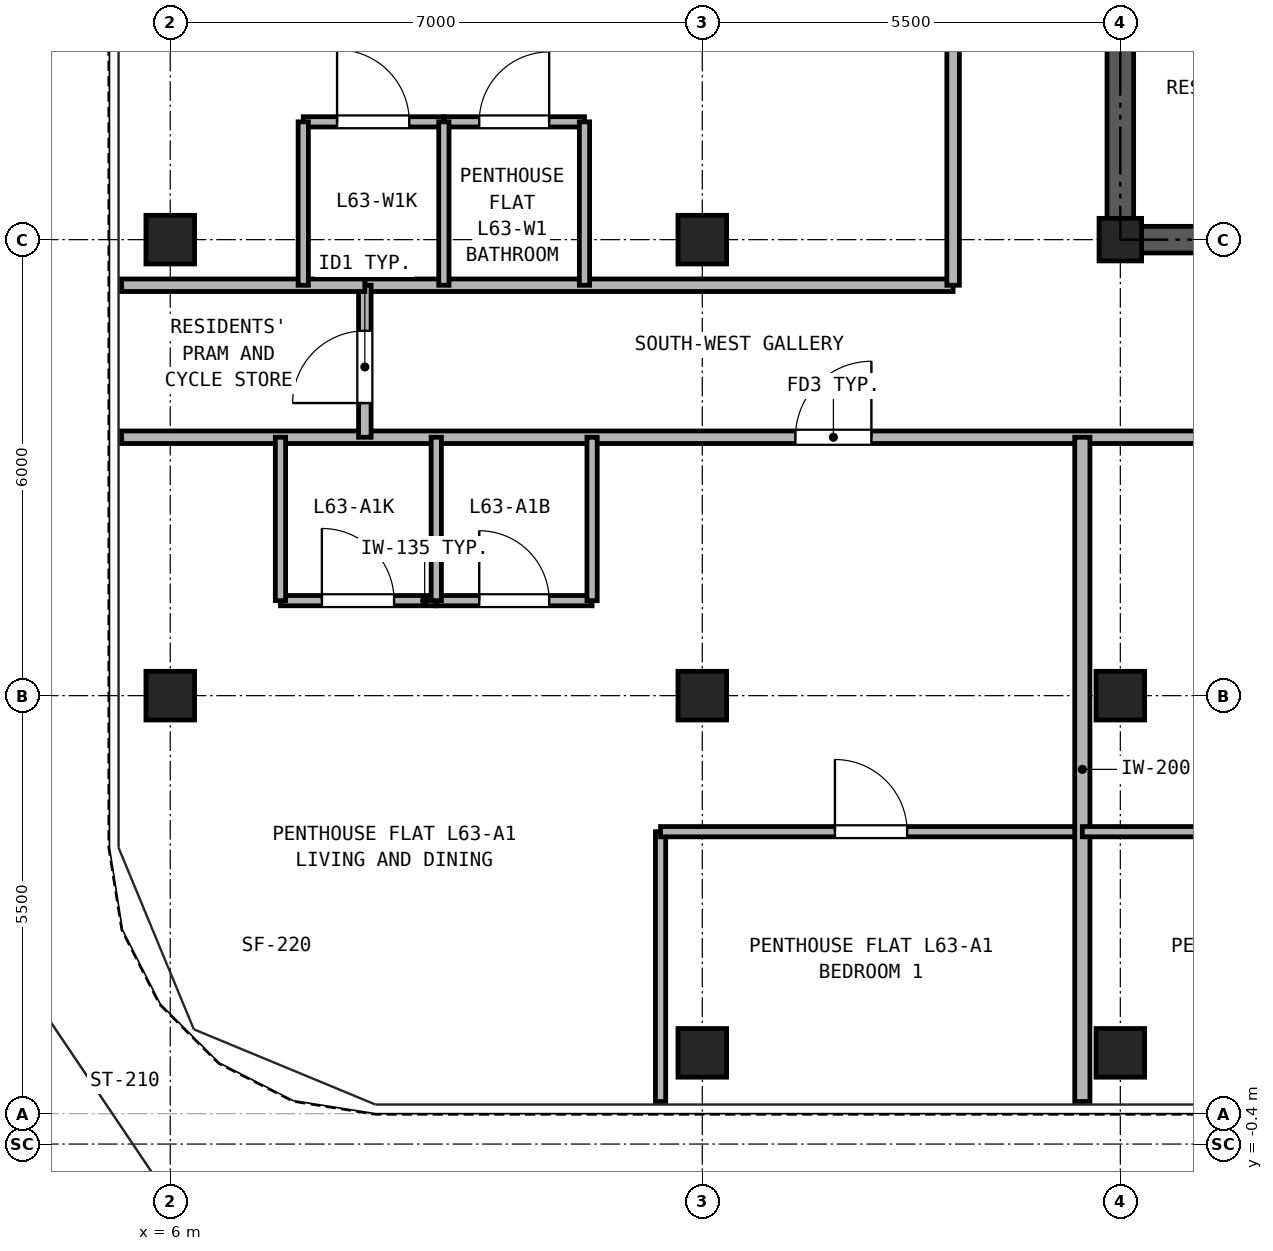
"""IFC4 building model, lengths in metres.
Left out: names, types, materials, properties, quantities, classifications, styles, units other than length and angle.
Written with IfcOpenShell. Run it as: python <this file> out.ifc"""

import sys

from ifc_helpers import new_model, si_unit, direction, frame, frame_2d, origin, origin_2d, place, context, subcontext, project, spatial, rectangle, hollow_rectangle, extrude, source, transform, mapped, element, fill, save


model = new_model("IFC4")
c1 = context("Model", 3, precision=1e-05, world=origin(), true_north=direction((0.0, 1.0)))
c2 = subcontext(c1, "Body", "Model", "MODEL_VIEW")
j1 = project(units=[si_unit("LENGTHUNIT", "METRE"), si_unit("PLANEANGLEUNIT", "RADIAN")], contexts=[c1])
p1 = place(None, origin())
s1 = spatial("IfcSite", under=j1, at=p1, CompositionType="ELEMENT")
p2 = place(p1, origin())
s2 = spatial("IfcBuilding", under=s1, at=p2, CompositionType="ELEMENT")
p3 = place(p2, frame((0.0, 0.0, 223.3)))
s3 = spatial("IfcBuildingStorey", under=s2, at=p3, CompositionType="ELEMENT", Elevation=223.3)
m1 = source(origin(), c2, "Body", "SweptSolid", [
    extrude(hollow_rectangle(XDim=0.64, YDim=0.64, WallThickness=0.035, at=origin_2d()), origin(), (0.0, 0.0, 1.0), 2.98),
])
for number, where, z_axis, x_axis in (
    (1, (13.0, 0.8, 0.0), (0.0, 0.0, 1.0), (1.0, 0.0, 0.0)),
    (2, (18.5, 0.8, 0.0), (0.0, 0.0, 1.0), (1.0, 0.0, 0.0)),
    (3, (6.0, 5.5, 0.0), (0.0, 0.0, 1.0), (1.0, 0.0, 0.0)),
    (4, (6.0, 11.5, 0.0), (0.0, 0.0, 1.0), (1.0, 0.0, 0.0)),
    (5, (13.0, 5.5, 0.0), (0.0, 0.0, 1.0), (1.0, 0.0, 0.0)),
    (6, (13.0, 11.5, 0.0), (0.0, 0.0, 1.0), (1.0, 0.0, 0.0)),
    (7, (18.5, 5.5, 0.0), (0.0, 0.0, 1.0), (1.0, 0.0, 0.0)),
):
    element("IfcColumn", number, at=place(p3, frame(where, z_axis=z_axis, x_axis=x_axis)), inside=s3, PredefinedType="COLUMN", context=c2, shape_type="MappedRepresentation", body=[
        mapped(m1, transform((0.0, 0.0, 0.0), x_axis=(1.0, 0.0, 0.0), y_axis=(0.0, 1.0, 0.0), z_axis=(0.0, 0.0, 1.0), scale=1.0)),
    ])
m2 = source(origin(), c2, "Body", "SweptSolid", [
    extrude(hollow_rectangle(XDim=0.56, YDim=0.56, WallThickness=0.03, at=origin_2d()), origin(), (0.0, 0.0, 1.0), 2.98),
])
p4 = place(p3, frame((18.5, 11.5, 0.0), z_axis=(0.0, 0.0, 1.0), x_axis=(1.0, 0.0, 0.0)))
e8 = element("IfcColumn", 8, at=p4, inside=s3, PredefinedType="COLUMN", context=c2, shape_type="MappedRepresentation", body=[
    mapped(m2, transform((0.0, 0.0, 0.0), x_axis=(1.0, 0.0, 0.0), y_axis=(0.0, 1.0, 0.0), z_axis=(0.0, 0.0, 1.0), scale=1.0)),
])
p5 = place(p3, frame((18.325, 11.5, 0.0), z_axis=(0.0, 0.0, 1.0), x_axis=(1.0, 0.0, 0.0)))
e9 = element("IfcWall", 9, at=p5, inside=s3, PredefinedType="SHEAR", context=c2, shape_type="SweptSolid", body=[
    extrude(rectangle(XDim=10.35, YDim=0.35, at=frame_2d((5.175, 0.0))), origin(), (0.0, 0.0, 1.0), 2.98),
])
p6 = place(p5, frame((1.775, 0.0, 0.0)))
e10 = element("IfcOpeningElement", 10, at=p6, cuts=e9, PredefinedType="OPENING", context=c2, shape_type="SweptSolid", body=[
    extrude(rectangle(XDim=0.95, YDim=2.15, at=frame_2d((0.475, 1.075))), frame((0.0, 0.185, 0.0), z_axis=(0.0, -1.0, 0.0), x_axis=(1.0, 0.0, 0.0)), (0.0, 0.0, 1.0), 0.37),
])
p7 = place(p5, frame((5.275, 0.0, 0.0)))
e11 = element("IfcOpeningElement", 11, at=p7, cuts=e9, PredefinedType="OPENING", context=c2, shape_type="SweptSolid", body=[
    extrude(rectangle(XDim=0.95, YDim=2.15, at=frame_2d((0.475, 1.075))), frame((0.0, 0.185, 0.0), z_axis=(0.0, -1.0, 0.0), x_axis=(1.0, 0.0, 0.0)), (0.0, 0.0, 1.0), 0.37),
])
p8 = place(p5, frame((8.175, 0.0, 0.0)))
e12 = element("IfcOpeningElement", 12, at=p8, cuts=e9, PredefinedType="OPENING", context=c2, shape_type="SweptSolid", body=[
    extrude(rectangle(XDim=1.1, YDim=2.25, at=frame_2d((0.55, 1.125))), frame((0.0, 0.185, 0.0), z_axis=(0.0, -1.0, 0.0), x_axis=(1.0, 0.0, 0.0)), (0.0, 0.0, 1.0), 0.37),
])
p9 = place(p3, frame((18.5, 11.675, 0.0), z_axis=(0.0, 0.0, 1.0), x_axis=(0.0, 1.0, 0.0)))
e13 = element("IfcWall", 13, at=p9, inside=s3, PredefinedType="SHEAR", context=c2, shape_type="SweptSolid", body=[
    extrude(rectangle(XDim=16.9, YDim=0.35, at=frame_2d((8.45, 0.0))), origin(), (0.0, 0.0, 1.0), 2.98),
])
p10 = place(p9, frame((7.475, 0.0, 0.0)))
e14 = element("IfcOpeningElement", 14, at=p10, cuts=e13, PredefinedType="OPENING", context=c2, shape_type="SweptSolid", body=[
    extrude(rectangle(XDim=1.15, YDim=2.2, at=frame_2d((0.575, 1.1))), frame((0.0, 0.185, 0.0), z_axis=(0.0, -1.0, 0.0), x_axis=(1.0, 0.0, 0.0)), (0.0, 0.0, 1.0), 0.37),
])
p11 = place(p3, frame((5.36, 8.9, 0.0), z_axis=(0.0, 0.0, 1.0), x_axis=(1.0, 0.0, 0.0)))
e15 = element("IfcWall", 15, at=p11, inside=s3, PredefinedType="PARTITIONING", context=c2, shape_type="SweptSolid", body=[
    extrude(rectangle(XDim=36.28, YDim=0.165, at=frame_2d((18.14, 0.0))), origin(), (0.0, 0.0, 1.0), 2.98),
])
p12 = place(p11, frame((8.865, 0.0, 0.0)))
e16 = element("IfcOpeningElement", 16, at=p12, cuts=e15, PredefinedType="OPENING", context=c2, shape_type="SweptSolid", body=[
    extrude(rectangle(XDim=1.0, YDim=2.15, at=frame_2d((0.5, 1.075))), frame((0.0, 0.093, 0.0), z_axis=(0.0, -1.0, 0.0), x_axis=(1.0, 0.0, 0.0)), (0.0, 0.0, 1.0), 0.185),
])
p13 = place(p11, frame((14.665, 0.0, 0.0)))
e17 = element("IfcOpeningElement", 17, at=p13, cuts=e15, PredefinedType="OPENING", context=c2, shape_type="SweptSolid", body=[
    extrude(rectangle(XDim=1.0, YDim=2.15, at=frame_2d((0.5, 1.075))), frame((0.0, 0.093, 0.0), z_axis=(0.0, -1.0, 0.0), x_axis=(1.0, 0.0, 0.0)), (0.0, 0.0, 1.0), 0.185),
])
p14 = place(p11, frame((26.915, 0.0, 0.0)))
e18 = element("IfcOpeningElement", 18, at=p14, cuts=e15, PredefinedType="OPENING", context=c2, shape_type="SweptSolid", body=[
    extrude(rectangle(XDim=1.0, YDim=2.15, at=frame_2d((0.5, 1.075))), frame((0.0, 0.093, 0.0), z_axis=(0.0, -1.0, 0.0), x_axis=(1.0, 0.0, 0.0)), (0.0, 0.0, 1.0), 0.185),
])
p15 = place(p3, frame((8.56, 10.9, 0.0), z_axis=(0.0, 0.0, 1.0), x_axis=(1.0, 0.0, 0.0)))
e19 = element("IfcWall", 19, at=p15, inside=s3, PredefinedType="PARTITIONING", context=c2, shape_type="SweptSolid", body=[
    extrude(rectangle(XDim=7.74, YDim=0.165, at=frame_2d((3.87, 0.0))), origin(), (0.0, 0.0, 1.0), 2.98),
])
p16 = place(p3, frame((8.56, 8.9, 0.0), z_axis=(0.0, 0.0, 1.0), x_axis=(0.0, 1.0, 0.0)))
e20 = element("IfcWall", 20, at=p16, inside=s3, PredefinedType="PARTITIONING", context=c2, shape_type="SweptSolid", body=[
    extrude(rectangle(XDim=2.0, YDim=0.165, at=frame_2d((1.0, 0.0))), origin(), (0.0, 0.0, 1.0), 2.98),
])
p17 = place(p16, frame((0.45, 0.0, 0.0)))
e21 = element("IfcOpeningElement", 21, at=p17, cuts=e20, PredefinedType="OPENING", context=c2, shape_type="SweptSolid", body=[
    extrude(rectangle(XDim=0.95, YDim=2.15, at=frame_2d((0.475, 1.075))), frame((0.0, 0.093, 0.0), z_axis=(0.0, -1.0, 0.0), x_axis=(1.0, 0.0, 0.0)), (0.0, 0.0, 1.0), 0.185),
])
p18 = place(p3, frame((16.3, 10.9, 0.0), z_axis=(0.0, 0.0, 1.0), x_axis=(0.0, 1.0, 0.0)))
e22 = element("IfcWall", 22, at=p18, inside=s3, PredefinedType="PARTITIONING", context=c2, shape_type="SweptSolid", body=[
    extrude(rectangle(XDim=24.24, YDim=0.165, at=frame_2d((12.12, 0.0))), origin(), (0.0, 0.0, 1.0), 2.98),
])
p19 = place(p18, frame((5.05, 0.0, 0.0)))
e23 = element("IfcOpeningElement", 23, at=p19, cuts=e22, PredefinedType="OPENING", context=c2, shape_type="SweptSolid", body=[
    extrude(rectangle(XDim=1.0, YDim=2.15, at=frame_2d((0.5, 1.075))), frame((0.0, 0.093, 0.0), z_axis=(0.0, -1.0, 0.0), x_axis=(1.0, 0.0, 0.0)), (0.0, 0.0, 1.0), 0.185),
])
p20 = place(p18, frame((14.8, 0.0, 0.0)))
e24 = element("IfcOpeningElement", 24, at=p20, cuts=e22, PredefinedType="OPENING", context=c2, shape_type="SweptSolid", body=[
    extrude(rectangle(XDim=1.0, YDim=2.15, at=frame_2d((0.5, 1.075))), frame((0.0, 0.093, 0.0), z_axis=(0.0, -1.0, 0.0), x_axis=(1.0, 0.0, 0.0)), (0.0, 0.0, 1.0), 0.185),
])
p21 = place(p3, frame((7.45, 6.75, 0.0), z_axis=(0.0, 0.0, 1.0), x_axis=(1.0, 0.0, 0.0)))
e25 = element("IfcWall", 25, at=p21, inside=s3, PredefinedType="PARTITIONING", context=c2, shape_type="SweptSolid", body=[
    extrude(rectangle(XDim=2.05, YDim=0.135, at=frame_2d((1.025, 0.0))), origin(), (0.0, 0.0, 1.0), 2.98),
])
p22 = place(p21, frame((0.545, 0.0, 0.0)))
e26 = element("IfcOpeningElement", 26, at=p22, cuts=e25, PredefinedType="OPENING", context=c2, shape_type="SweptSolid", body=[
    extrude(rectangle(XDim=0.95, YDim=2.15, at=frame_2d((0.475, 1.075))), frame((0.0, 0.077, 0.0), z_axis=(0.0, -1.0, 0.0), x_axis=(1.0, 0.0, 0.0)), (0.0, 0.0, 1.0), 0.155),
])
p23 = place(p3, frame((9.5, 6.75, 0.0), z_axis=(0.0, 0.0, 1.0), x_axis=(1.0, 0.0, 0.0)))
e27 = element("IfcWall", 27, at=p23, inside=s3, PredefinedType="PARTITIONING", context=c2, shape_type="SweptSolid", body=[
    extrude(rectangle(XDim=2.05, YDim=0.135, at=frame_2d((1.025, 0.0))), origin(), (0.0, 0.0, 1.0), 2.98),
])
p24 = place(p23, frame((0.565, 0.0, 0.0)))
e28 = element("IfcOpeningElement", 28, at=p24, cuts=e27, PredefinedType="OPENING", context=c2, shape_type="SweptSolid", body=[
    extrude(rectangle(XDim=0.92, YDim=2.1, at=frame_2d((0.46, 1.05))), frame((0.0, 0.077, 0.0), z_axis=(0.0, -1.0, 0.0), x_axis=(1.0, 0.0, 0.0)), (0.0, 0.0, 1.0), 0.155),
])
for number, where, z_axis, x_axis in (
    (29, (7.45, 6.75, 0.0), (0.0, 0.0, 1.0), (0.0, 1.0, 0.0)),
    (30, (9.5, 6.75, 0.0), (0.0, 0.0, 1.0), (0.0, 1.0, 0.0)),
    (31, (11.55, 6.75, 0.0), (0.0, 0.0, 1.0), (0.0, 1.0, 0.0)),
):
    element("IfcWall", number, at=place(p3, frame(where, z_axis=z_axis, x_axis=x_axis)), inside=s3, PredefinedType="PARTITIONING", context=c2, shape_type="SweptSolid", body=[
        extrude(rectangle(XDim=2.15, YDim=0.135, at=frame_2d((1.075, 0.0))), origin(), (0.0, 0.0, 1.0), 2.98),
    ])
p25 = place(p3, frame((12.451, 0.16, 0.0), z_axis=(0.0, 0.0, 1.0), x_axis=(0.0, 1.0, 0.0)))
e32 = element("IfcWall", 32, at=p25, inside=s3, PredefinedType="PARTITIONING", context=c2, shape_type="SweptSolid", body=[
    extrude(rectangle(XDim=3.55, YDim=0.135, at=frame_2d((1.775, 0.0))), origin(), (0.0, 0.0, 1.0), 2.98),
])
p26 = place(p3, frame((12.451, 3.71, 0.0), z_axis=(0.0, 0.0, 1.0), x_axis=(1.0, 0.0, 0.0)))
e33 = element("IfcWall", 33, at=p26, inside=s3, PredefinedType="PARTITIONING", context=c2, shape_type="SweptSolid", body=[
    extrude(rectangle(XDim=5.549, YDim=0.135, at=frame_2d((2.774, 0.0))), origin(), (0.0, 0.0, 1.0), 2.98),
])
p27 = place(p26, frame((2.294, 0.0, 0.0)))
e34 = element("IfcOpeningElement", 34, at=p27, cuts=e33, PredefinedType="OPENING", context=c2, shape_type="SweptSolid", body=[
    extrude(rectangle(XDim=0.95, YDim=2.15, at=frame_2d((0.475, 1.075))), frame((0.0, 0.077, 0.0), z_axis=(0.0, -1.0, 0.0), x_axis=(1.0, 0.0, 0.0)), (0.0, 0.0, 1.0), 0.155),
])
p28 = place(p3, frame((18.0, 0.16, 0.0), z_axis=(0.0, 0.0, 1.0), x_axis=(0.0, 1.0, 0.0)))
e35 = element("IfcWall", 35, at=p28, inside=s3, PredefinedType="PARTITIONING", context=c2, shape_type="SweptSolid", body=[
    extrude(rectangle(XDim=8.74, YDim=0.2, at=frame_2d((4.37, 0.0))), origin(), (0.0, 0.0, 1.0), 2.98),
])
p29 = place(p3, frame((18.0, 3.71, 0.0), z_axis=(0.0, 0.0, 1.0), x_axis=(1.0, 0.0, 0.0)))
e36 = element("IfcWall", 36, at=p29, inside=s3, PredefinedType="PARTITIONING", context=c2, shape_type="SweptSolid", body=[
    extrude(rectangle(XDim=5.704, YDim=0.135, at=frame_2d((2.852, 0.0))), origin(), (0.0, 0.0, 1.0), 2.98),
])
p30 = place(p29, frame((2.372, 0.0, 0.0)))
e37 = element("IfcOpeningElement", 37, at=p30, cuts=e36, PredefinedType="OPENING", context=c2, shape_type="SweptSolid", body=[
    extrude(rectangle(XDim=0.95, YDim=2.15, at=frame_2d((0.475, 1.075))), frame((0.0, 0.077, 0.0), z_axis=(0.0, -1.0, 0.0), x_axis=(1.0, 0.0, 0.0)), (0.0, 0.0, 1.0), 0.155),
])
p31 = place(p3, frame((5.36, 10.9, 0.0), z_axis=(0.0, 0.0, 1.0), x_axis=(1.0, 0.0, 0.0)))
e38 = element("IfcWall", 38, at=p31, inside=s3, PredefinedType="PARTITIONING", context=c2, shape_type="SweptSolid", body=[
    extrude(rectangle(XDim=3.2, YDim=0.165, at=frame_2d((1.6, 0.0))), origin(), (0.0, 0.0, 1.0), 2.98),
])
p32 = place(p3, frame((7.75, 13.05, 0.0), z_axis=(0.0, 0.0, 1.0), x_axis=(1.0, 0.0, 0.0)))
e39 = element("IfcWall", 39, at=p32, inside=s3, PredefinedType="PARTITIONING", context=c2, shape_type="SweptSolid", body=[
    extrude(rectangle(XDim=1.85, YDim=0.135, at=frame_2d((0.925, 0.0))), origin(), (0.0, 0.0, 1.0), 2.98),
])
p33 = place(p32, frame((0.445, 0.0, 0.0)))
e40 = element("IfcOpeningElement", 40, at=p33, cuts=e39, PredefinedType="OPENING", context=c2, shape_type="SweptSolid", body=[
    extrude(rectangle(XDim=0.95, YDim=2.15, at=frame_2d((0.475, 1.075))), frame((0.0, 0.077, 0.0), z_axis=(0.0, -1.0, 0.0), x_axis=(1.0, 0.0, 0.0)), (0.0, 0.0, 1.0), 0.155),
])
p34 = place(p3, frame((9.6, 13.05, 0.0), z_axis=(0.0, 0.0, 1.0), x_axis=(1.0, 0.0, 0.0)))
e41 = element("IfcWall", 41, at=p34, inside=s3, PredefinedType="PARTITIONING", context=c2, shape_type="SweptSolid", body=[
    extrude(rectangle(XDim=1.85, YDim=0.135, at=frame_2d((0.925, 0.0))), origin(), (0.0, 0.0, 1.0), 2.98),
])
p35 = place(p34, frame((0.465, 0.0, 0.0)))
e42 = element("IfcOpeningElement", 42, at=p35, cuts=e41, PredefinedType="OPENING", context=c2, shape_type="SweptSolid", body=[
    extrude(rectangle(XDim=0.92, YDim=2.1, at=frame_2d((0.46, 1.05))), frame((0.0, 0.077, 0.0), z_axis=(0.0, -1.0, 0.0), x_axis=(1.0, 0.0, 0.0)), (0.0, 0.0, 1.0), 0.155),
])
for number, where, z_axis, x_axis in (
    (43, (7.75, 10.9, 0.0), (0.0, 0.0, 1.0), (0.0, 1.0, 0.0)),
    (44, (9.6, 10.9, 0.0), (0.0, 0.0, 1.0), (0.0, 1.0, 0.0)),
    (45, (11.45, 10.9, 0.0), (0.0, 0.0, 1.0), (0.0, 1.0, 0.0)),
):
    element("IfcWall", number, at=place(p3, frame(where, z_axis=z_axis, x_axis=x_axis)), inside=s3, PredefinedType="PARTITIONING", context=c2, shape_type="SweptSolid", body=[
        extrude(rectangle(XDim=2.15, YDim=0.135, at=frame_2d((1.075, 0.0))), origin(), (0.0, 0.0, 1.0), 2.98),
    ])
p36 = place(p22, origin())
e46 = element("IfcDoor", 46, at=p36, inside=s3, OperationType="SINGLE_SWING_LEFT", PredefinedType="DOOR", context=c2, shape_type="SweptSolid", body=[
    extrude(rectangle(XDim=0.95, YDim=2.15, at=frame_2d((0.475, 1.075))), frame((0.0, 0.025, 0.0), z_axis=(0.0, -1.0, 0.0), x_axis=(1.0, 0.0, 0.0)), (0.0, 0.0, 1.0), 0.05),
])
fill(e26, e46)
p37 = place(p24, origin())
e47 = element("IfcDoor", 47, at=p37, inside=s3, OperationType="SINGLE_SWING_LEFT", PredefinedType="DOOR", context=c2, shape_type="SweptSolid", body=[
    extrude(rectangle(XDim=0.92, YDim=2.1, at=frame_2d((0.46, 1.05))), frame((0.0, 0.025, 0.0), z_axis=(0.0, -1.0, 0.0), x_axis=(1.0, 0.0, 0.0)), (0.0, 0.0, 1.0), 0.05),
])
fill(e28, e47)
p38 = place(p27, frame((0.95, 0.0, 0.0), z_axis=(0.0, 0.0, 1.0), x_axis=(-1.0, 0.0, 0.0)))
e48 = element("IfcDoor", 48, at=p38, inside=s3, OperationType="SINGLE_SWING_LEFT", PredefinedType="DOOR", context=c2, shape_type="SweptSolid", body=[
    extrude(rectangle(XDim=0.95, YDim=2.15, at=frame_2d((0.475, 1.075))), frame((0.0, 0.025, 0.0), z_axis=(0.0, -1.0, 0.0), x_axis=(1.0, 0.0, 0.0)), (0.0, 0.0, 1.0), 0.05),
])
fill(e34, e48)
p39 = place(p12, frame((1.0, 0.0, 0.0), z_axis=(0.0, 0.0, 1.0), x_axis=(-1.0, 0.0, 0.0)))
e49 = element("IfcDoor", 49, at=p39, inside=s3, OperationType="SINGLE_SWING_RIGHT", PredefinedType="DOOR", context=c2, shape_type="SweptSolid", body=[
    extrude(rectangle(XDim=1.0, YDim=2.15, at=frame_2d((0.5, 1.075))), frame((0.0, 0.025, 0.0), z_axis=(0.0, -1.0, 0.0), x_axis=(1.0, 0.0, 0.0)), (0.0, 0.0, 1.0), 0.05),
])
fill(e16, e49)
p40 = place(p17, frame((0.95, 0.0, 0.0), z_axis=(0.0, 0.0, 1.0), x_axis=(-1.0, 0.0, 0.0)))
e50 = element("IfcDoor", 50, at=p40, inside=s3, OperationType="SINGLE_SWING_LEFT", PredefinedType="DOOR", context=c2, shape_type="SweptSolid", body=[
    extrude(rectangle(XDim=0.95, YDim=2.15, at=frame_2d((0.475, 1.075))), frame((0.0, 0.025, 0.0), z_axis=(0.0, -1.0, 0.0), x_axis=(1.0, 0.0, 0.0)), (0.0, 0.0, 1.0), 0.05),
])
fill(e21, e50)
p41 = place(p33, origin())
e51 = element("IfcDoor", 51, at=p41, inside=s3, OperationType="SINGLE_SWING_LEFT", PredefinedType="DOOR", context=c2, shape_type="SweptSolid", body=[
    extrude(rectangle(XDim=0.95, YDim=2.15, at=frame_2d((0.475, 1.075))), frame((0.0, 0.025, 0.0), z_axis=(0.0, -1.0, 0.0), x_axis=(1.0, 0.0, 0.0)), (0.0, 0.0, 1.0), 0.05),
])
fill(e40, e51)
p42 = place(p35, origin())
e52 = element("IfcDoor", 52, at=p42, inside=s3, OperationType="SINGLE_SWING_RIGHT", PredefinedType="DOOR", context=c2, shape_type="SweptSolid", body=[
    extrude(rectangle(XDim=0.92, YDim=2.1, at=frame_2d((0.46, 1.05))), frame((0.0, 0.025, 0.0), z_axis=(0.0, -1.0, 0.0), x_axis=(1.0, 0.0, 0.0)), (0.0, 0.0, 1.0), 0.05),
])
fill(e42, e52)
save(model, sys.argv[1])
